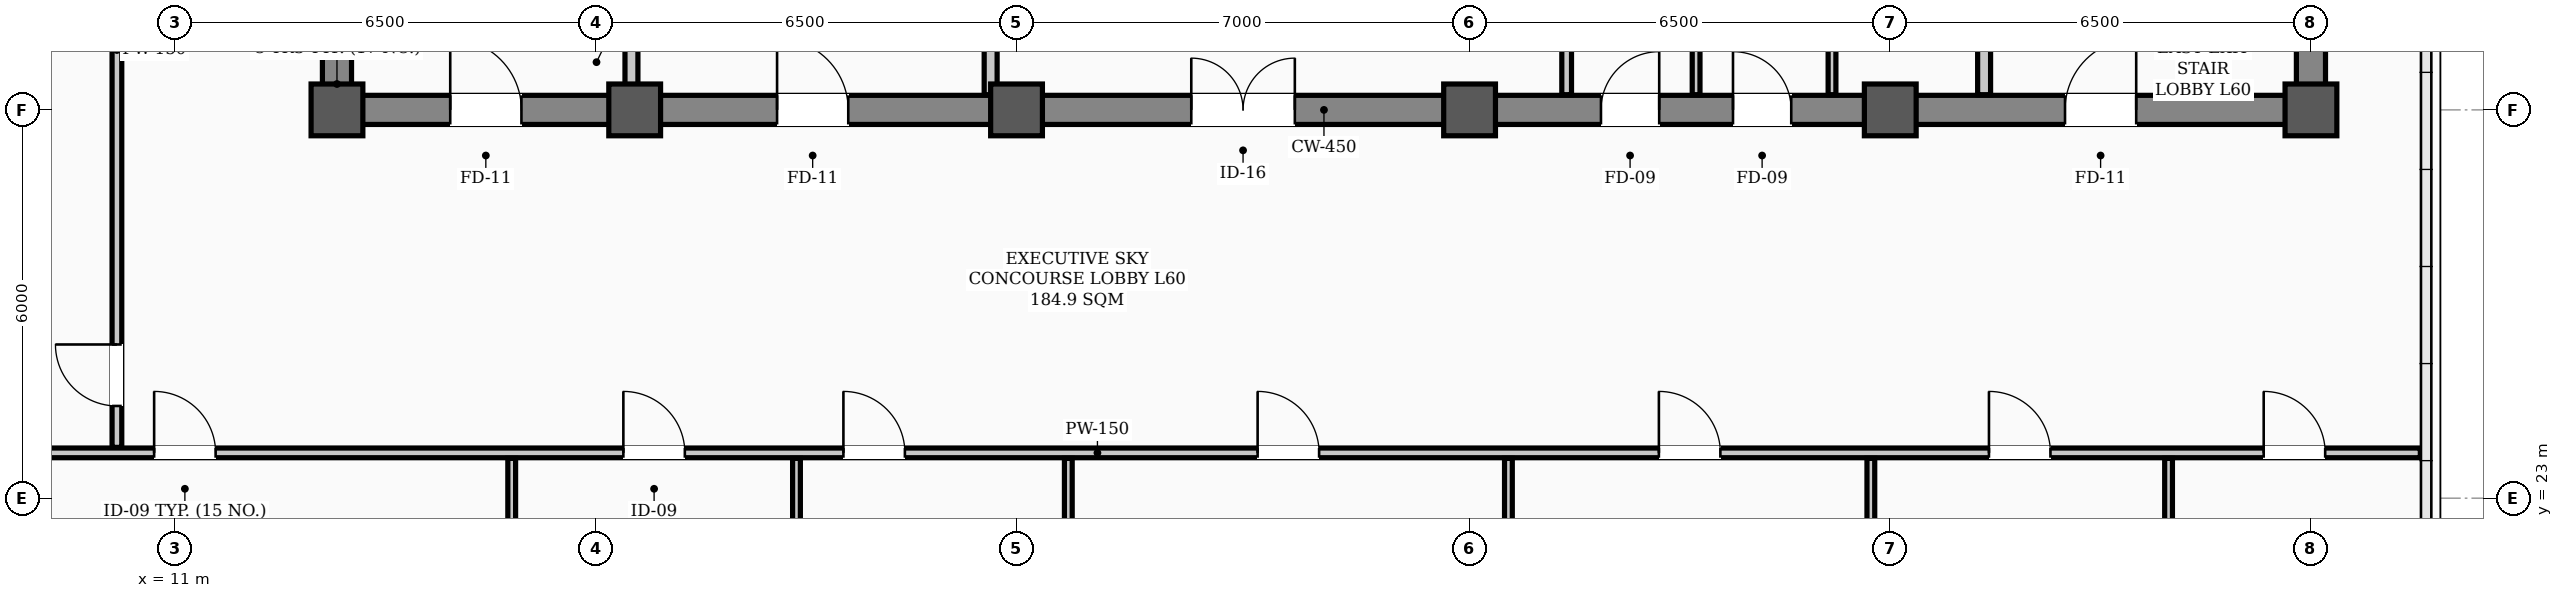
"""IFC4 building model, lengths in metres.
Left out: names, types, materials, properties, quantities, classifications, styles, units other than length and angle.
Written with IfcOpenShell. Run it as: python <this file> out.ifc"""

import sys

from ifc_helpers import new_model, si_unit, direction, frame, frame_2d, origin, origin_2d, place, context, subcontext, project, spatial, rectangle, hollow_rectangle, extrude, element, fill, save


model = new_model("IFC4")
c1 = context("Model", 3, precision=1e-05, world=origin(), true_north=direction((0.0, 1.0)))
c2 = subcontext(c1, "Body", "Model", "MODEL_VIEW")
j1 = project(units=[si_unit("LENGTHUNIT", "METRE"), si_unit("PLANEANGLEUNIT", "RADIAN")], contexts=[c1])
p1 = place(None, origin())
s1 = spatial("IfcSite", under=j1, at=p1, CompositionType="ELEMENT")
p2 = place(p1, origin())
s2 = spatial("IfcBuilding", under=s1, at=p2, CompositionType="ELEMENT")
p3 = place(p2, frame((0.0, 0.0, 242.3)))
s3 = spatial("IfcBuildingStorey", under=s2, at=p3, CompositionType="ELEMENT", Elevation=242.3)
for number, where, z_axis, x_axis in (
    (1, (13.5, 29.0, 0.0), (0.0, 0.0, 1.0), (1.0, 0.0, 0.0)),
    (2, (18.1, 29.0, 0.0), (0.0, 0.0, 1.0), (1.0, 0.0, 0.0)),
    (3, (24.0, 29.0, 0.0), (0.0, 0.0, 1.0), (1.0, 0.0, 0.0)),
    (4, (31.0, 29.0, 0.0), (0.0, 0.0, 1.0), (1.0, 0.0, 0.0)),
    (5, (37.5, 29.0, 0.0), (0.0, 0.0, 1.0), (1.0, 0.0, 0.0)),
    (6, (44.0, 29.0, 0.0), (0.0, 0.0, 1.0), (1.0, 0.0, 0.0)),
):
    element("IfcColumn", number, at=place(p3, frame(where, z_axis=z_axis, x_axis=x_axis)), inside=s3, PredefinedType="COLUMN", context=c2, shape_type="SweptSolid", body=[
        extrude(hollow_rectangle(XDim=0.8, YDim=0.8, WallThickness=0.032, InnerFilletRadius=0.016, OuterFilletRadius=0.048, at=origin_2d()), origin(), (0.0, 0.0, 1.0), 3.9),
    ])
p4 = place(p3, frame((13.5, 29.0, 0.0), z_axis=(0.0, 0.0, 1.0), x_axis=(1.0, 0.0, 0.0)))
e7 = element("IfcWall", 7, at=p4, inside=s3, PredefinedType="SHEAR", context=c2, shape_type="SweptSolid", body=[
    extrude(rectangle(XDim=30.5, YDim=0.45, at=frame_2d((15.25, 0.0))), origin(), (0.0, 0.0, 1.0), 3.72),
])
p5 = place(p4, frame((1.75, 0.0, 0.0)))
e8 = element("IfcOpeningElement", 8, at=p5, cuts=e7, PredefinedType="OPENING", context=c2, shape_type="SweptSolid", body=[
    extrude(rectangle(XDim=1.1, YDim=2.08, at=frame_2d((0.55, 1.04))), frame((0.0, 0.235, 0.0), z_axis=(0.0, -1.0, 0.0), x_axis=(1.0, 0.0, 0.0)), (0.0, 0.0, 1.0), 0.47),
])
p6 = place(p4, frame((26.7, 0.0, 0.0)))
e9 = element("IfcOpeningElement", 9, at=p6, cuts=e7, PredefinedType="OPENING", context=c2, shape_type="SweptSolid", body=[
    extrude(rectangle(XDim=1.1, YDim=2.08, at=frame_2d((0.55, 1.04))), frame((0.0, 0.235, 0.0), z_axis=(0.0, -1.0, 0.0), x_axis=(1.0, 0.0, 0.0)), (0.0, 0.0, 1.0), 0.47),
])
p7 = place(p4, frame((6.8, 0.0, 0.0)))
e10 = element("IfcOpeningElement", 10, at=p7, cuts=e7, PredefinedType="OPENING", context=c2, shape_type="SweptSolid", body=[
    extrude(rectangle(XDim=1.1, YDim=2.08, at=frame_2d((0.55, 1.04))), frame((0.0, 0.235, 0.0), z_axis=(0.0, -1.0, 0.0), x_axis=(1.0, 0.0, 0.0)), (0.0, 0.0, 1.0), 0.47),
])
p8 = place(p4, frame((13.2, 0.0, 0.0)))
e11 = element("IfcOpeningElement", 11, at=p8, cuts=e7, PredefinedType="OPENING", context=c2, shape_type="SweptSolid", body=[
    extrude(rectangle(XDim=1.6, YDim=2.08, at=frame_2d((0.8, 1.04))), frame((0.0, 0.235, 0.0), z_axis=(0.0, -1.0, 0.0), x_axis=(1.0, 0.0, 0.0)), (0.0, 0.0, 1.0), 0.47),
])
p9 = place(p4, frame((19.53, 0.0, 0.0)))
e12 = element("IfcOpeningElement", 12, at=p9, cuts=e7, PredefinedType="OPENING", context=c2, shape_type="SweptSolid", body=[
    extrude(rectangle(XDim=0.9, YDim=2.08, at=frame_2d((0.45, 1.04))), frame((0.0, 0.235, 0.0), z_axis=(0.0, -1.0, 0.0), x_axis=(1.0, 0.0, 0.0)), (0.0, 0.0, 1.0), 0.47),
])
p10 = place(p4, frame((21.57, 0.0, 0.0)))
e13 = element("IfcOpeningElement", 13, at=p10, cuts=e7, PredefinedType="OPENING", context=c2, shape_type="SweptSolid", body=[
    extrude(rectangle(XDim=0.9, YDim=2.08, at=frame_2d((0.45, 1.04))), frame((0.0, 0.235, 0.0), z_axis=(0.0, -1.0, 0.0), x_axis=(1.0, 0.0, 0.0)), (0.0, 0.0, 1.0), 0.47),
])
for number, where, z_axis, x_axis in (
    (14, (13.5, 29.35, 0.0), (0.0, 0.0, 1.0), (0.0, 1.0, 0.0)),
    (15, (44.0, 29.35, 0.0), (0.0, 0.0, 1.0), (0.0, 1.0, 0.0)),
):
    element("IfcWall", number, at=place(p3, frame(where, z_axis=z_axis, x_axis=x_axis)), inside=s3, PredefinedType="SHEAR", context=c2, shape_type="SweptSolid", body=[
        extrude(rectangle(XDim=8.6, YDim=0.45, at=frame_2d((4.3, 0.0))), origin(), (0.0, 0.0, 1.0), 3.72),
    ])
p11 = place(p3, frame((4.81, 23.7, 0.0), z_axis=(0.0, 0.0, 1.0), x_axis=(1.0, 0.0, 0.0)))
e16 = element("IfcWall", 16, at=p11, inside=s3, PredefinedType="PARTITIONING", context=c2, shape_type="SweptSolid", body=[
    extrude(rectangle(XDim=40.88, YDim=0.15, at=frame_2d((20.44, 0.0))), origin(), (0.0, 0.0, 1.0), 3.2),
])
p12 = place(p11, frame((5.865, 0.0, 0.0)))
e17 = element("IfcOpeningElement", 17, at=p12, cuts=e16, PredefinedType="OPENING", context=c2, shape_type="SweptSolid", body=[
    extrude(rectangle(XDim=0.95, YDim=2.08, at=frame_2d((0.475, 1.04))), frame((0.0, 0.085, 0.0), z_axis=(0.0, -1.0, 0.0), x_axis=(1.0, 0.0, 0.0)), (0.0, 0.0, 1.0), 0.17),
])
p13 = place(p11, frame((13.115, 0.0, 0.0)))
e18 = element("IfcOpeningElement", 18, at=p13, cuts=e16, PredefinedType="OPENING", context=c2, shape_type="SweptSolid", body=[
    extrude(rectangle(XDim=0.95, YDim=2.08, at=frame_2d((0.475, 1.04))), frame((0.0, 0.085, 0.0), z_axis=(0.0, -1.0, 0.0), x_axis=(1.0, 0.0, 0.0)), (0.0, 0.0, 1.0), 0.17),
])
p14 = place(p11, frame((16.515, 0.0, 0.0)))
e19 = element("IfcOpeningElement", 19, at=p14, cuts=e16, PredefinedType="OPENING", context=c2, shape_type="SweptSolid", body=[
    extrude(rectangle(XDim=0.95, YDim=2.08, at=frame_2d((0.475, 1.04))), frame((0.0, 0.085, 0.0), z_axis=(0.0, -1.0, 0.0), x_axis=(1.0, 0.0, 0.0)), (0.0, 0.0, 1.0), 0.17),
])
p15 = place(p11, frame((22.915, 0.0, 0.0)))
e20 = element("IfcOpeningElement", 20, at=p15, cuts=e16, PredefinedType="OPENING", context=c2, shape_type="SweptSolid", body=[
    extrude(rectangle(XDim=0.95, YDim=2.08, at=frame_2d((0.475, 1.04))), frame((0.0, 0.085, 0.0), z_axis=(0.0, -1.0, 0.0), x_axis=(1.0, 0.0, 0.0)), (0.0, 0.0, 1.0), 0.17),
])
p16 = place(p11, frame((29.115, 0.0, 0.0)))
e21 = element("IfcOpeningElement", 21, at=p16, cuts=e16, PredefinedType="OPENING", context=c2, shape_type="SweptSolid", body=[
    extrude(rectangle(XDim=0.95, YDim=2.08, at=frame_2d((0.475, 1.04))), frame((0.0, 0.085, 0.0), z_axis=(0.0, -1.0, 0.0), x_axis=(1.0, 0.0, 0.0)), (0.0, 0.0, 1.0), 0.17),
])
p17 = place(p11, frame((34.215, 0.0, 0.0)))
e22 = element("IfcOpeningElement", 22, at=p17, cuts=e16, PredefinedType="OPENING", context=c2, shape_type="SweptSolid", body=[
    extrude(rectangle(XDim=0.95, YDim=2.08, at=frame_2d((0.475, 1.04))), frame((0.0, 0.085, 0.0), z_axis=(0.0, -1.0, 0.0), x_axis=(1.0, 0.0, 0.0)), (0.0, 0.0, 1.0), 0.17),
])
p18 = place(p11, frame((38.46, 0.0, 0.0)))
e23 = element("IfcOpeningElement", 23, at=p18, cuts=e16, PredefinedType="OPENING", context=c2, shape_type="SweptSolid", body=[
    extrude(rectangle(XDim=0.95, YDim=2.08, at=frame_2d((0.475, 1.04))), frame((0.0, 0.085, 0.0), z_axis=(0.0, -1.0, 0.0), x_axis=(1.0, 0.0, 0.0)), (0.0, 0.0, 1.0), 0.17),
])
p19 = place(p3, frame((18.05, 29.235, 0.0), z_axis=(0.0, 0.0, 1.0), x_axis=(0.0, 1.0, 0.0)))
e24 = element("IfcWall", 24, at=p19, inside=s3, PredefinedType="STANDARD", context=c2, shape_type="SweptSolid", body=[
    extrude(rectangle(XDim=1.065, YDim=0.2, at=frame_2d((0.532, 0.0))), origin(), (0.0, 0.0, 1.0), 3.35),
])
p20 = place(p3, frame((38.95, 29.235, 0.0), z_axis=(0.0, 0.0, 1.0), x_axis=(0.0, 1.0, 0.0)))
e25 = element("IfcWall", 25, at=p20, inside=s3, PredefinedType="STANDARD", context=c2, shape_type="SweptSolid", body=[
    extrude(rectangle(XDim=1.065, YDim=0.2, at=frame_2d((0.532, 0.0))), origin(), (0.0, 0.0, 1.0), 3.72),
])
p21 = place(p3, frame((23.6, 29.235, 0.0), z_axis=(0.0, 0.0, 1.0), x_axis=(0.0, 1.0, 0.0)))
e26 = element("IfcWall", 26, at=p21, inside=s3, PredefinedType="STANDARD", context=c2, shape_type="SweptSolid", body=[
    extrude(rectangle(XDim=5.465, YDim=0.2, at=frame_2d((2.732, 0.0))), origin(), (0.0, 0.0, 1.0), 3.2),
])
p22 = place(p3, frame((32.5, 29.235, 0.0), z_axis=(0.0, 0.0, 1.0), x_axis=(0.0, 1.0, 0.0)))
e27 = element("IfcWall", 27, at=p22, inside=s3, PredefinedType="PARTITIONING", context=c2, shape_type="SweptSolid", body=[
    extrude(rectangle(XDim=2.53, YDim=0.15, at=frame_2d((1.265, 0.0))), origin(), (0.0, 0.0, 1.0), 3.35),
])
for number, where, z_axis, x_axis in (
    (28, (36.6, 29.235, 0.0), (0.0, 0.0, 1.0), (0.0, 1.0, 0.0)),
    (29, (34.5, 29.235, 0.0), (0.0, 0.0, 1.0), (0.0, 1.0, 0.0)),
):
    element("IfcWall", number, at=place(p3, frame(where, z_axis=z_axis, x_axis=x_axis)), inside=s3, PredefinedType="PARTITIONING", context=c2, shape_type="SweptSolid", body=[
        extrude(rectangle(XDim=2.53, YDim=0.12, at=frame_2d((1.265, 0.0))), origin(), (0.0, 0.0, 1.0), 3.35),
    ])
p23 = place(p3, frame((10.1, 23.785, 0.0), z_axis=(0.0, 0.0, 1.0), x_axis=(0.0, 1.0, 0.0)))
e30 = element("IfcWall", 30, at=p23, inside=s3, PredefinedType="PARTITIONING", context=c2, shape_type="SweptSolid", body=[
    extrude(rectangle(XDim=12.28, YDim=0.15, at=frame_2d((6.14, 0.0))), origin(), (0.0, 0.0, 1.0), 3.1),
])
p24 = place(p23, frame((0.64, 0.0, 0.0)))
e31 = element("IfcOpeningElement", 31, at=p24, cuts=e30, PredefinedType="OPENING", context=c2, shape_type="SweptSolid", body=[
    extrude(rectangle(XDim=0.95, YDim=2.08, at=frame_2d((0.475, 1.04))), frame((0.0, 0.085, 0.0), z_axis=(0.0, -1.0, 0.0), x_axis=(1.0, 0.0, 0.0)), (0.0, 0.0, 1.0), 0.17),
])
for number, where, z_axis, x_axis in (
    (32, (16.2, 12.41, 0.0), (0.0, 0.0, 1.0), (0.0, 1.0, 0.0)),
    (33, (20.6, 12.41, 0.0), (0.0, 0.0, 1.0), (0.0, 1.0, 0.0)),
):
    element("IfcWall", number, at=place(p3, frame(where, z_axis=z_axis, x_axis=x_axis)), inside=s3, PredefinedType="PARTITIONING", context=c2, shape_type="SweptSolid", body=[
        extrude(rectangle(XDim=11.205, YDim=0.12, at=frame_2d((5.603, 0.0))), origin(), (0.0, 0.0, 1.0), 3.1),
    ])
p25 = place(p3, frame((24.8, 14.17, 0.0), z_axis=(0.0, 0.0, 1.0), x_axis=(0.0, 1.0, 0.0)))
e34 = element("IfcWall", 34, at=p25, inside=s3, PredefinedType="PARTITIONING", context=c2, shape_type="SweptSolid", body=[
    extrude(rectangle(XDim=9.445, YDim=0.12, at=frame_2d((4.723, 0.0))), origin(), (0.0, 0.0, 1.0), 3.1),
])
for number, where, z_axis, x_axis in (
    (35, (31.6, 12.41, 0.0), (0.0, 0.0, 1.0), (0.0, 1.0, 0.0)),
    (36, (37.2, 12.41, 0.0), (0.0, 0.0, 1.0), (0.0, 1.0, 0.0)),
):
    element("IfcWall", number, at=place(p3, frame(where, z_axis=z_axis, x_axis=x_axis)), inside=s3, PredefinedType="PARTITIONING", context=c2, shape_type="SweptSolid", body=[
        extrude(rectangle(XDim=11.205, YDim=0.12, at=frame_2d((5.603, 0.0))), origin(), (0.0, 0.0, 1.0), 3.1),
    ])
p26 = place(p3, frame((41.8, 12.41, 0.0), z_axis=(0.0, 0.0, 1.0), x_axis=(0.0, 1.0, 0.0)))
e37 = element("IfcWall", 37, at=p26, inside=s3, PredefinedType="PARTITIONING", context=c2, shape_type="SweptSolid", body=[
    extrude(rectangle(XDim=11.205, YDim=0.12, at=frame_2d((5.603, 0.0))), origin(), (0.0, 0.0, 1.0), 3.72),
])
p27 = place(p5, origin())
e38 = element("IfcDoor", 38, at=p27, inside=s3, OperationType="SINGLE_SWING_LEFT", PredefinedType="DOOR", context=c2, shape_type="SweptSolid", body=[
    extrude(rectangle(XDim=1.1, YDim=2.08, at=frame_2d((0.55, 1.04))), frame((0.0, 0.025, 0.0), z_axis=(0.0, -1.0, 0.0), x_axis=(1.0, 0.0, 0.0)), (0.0, 0.0, 1.0), 0.05),
])
fill(e8, e38)
p28 = place(p6, origin())
e39 = element("IfcDoor", 39, at=p28, inside=s3, OperationType="SINGLE_SWING_RIGHT", PredefinedType="DOOR", context=c2, shape_type="SweptSolid", body=[
    extrude(rectangle(XDim=1.1, YDim=2.08, at=frame_2d((0.55, 1.04))), frame((0.0, 0.025, 0.0), z_axis=(0.0, -1.0, 0.0), x_axis=(1.0, 0.0, 0.0)), (0.0, 0.0, 1.0), 0.05),
])
fill(e9, e39)
p29 = place(p7, origin())
e40 = element("IfcDoor", 40, at=p29, inside=s3, OperationType="SINGLE_SWING_LEFT", PredefinedType="DOOR", context=c2, shape_type="SweptSolid", body=[
    extrude(rectangle(XDim=1.1, YDim=2.08, at=frame_2d((0.55, 1.04))), frame((0.0, 0.025, 0.0), z_axis=(0.0, -1.0, 0.0), x_axis=(1.0, 0.0, 0.0)), (0.0, 0.0, 1.0), 0.05),
])
fill(e10, e40)
p30 = place(p8, origin())
e41 = element("IfcDoor", 41, at=p30, inside=s3, OperationType="DOUBLE_DOOR_SINGLE_SWING", PredefinedType="DOOR", context=c2, shape_type="SweptSolid", body=[
    extrude(rectangle(XDim=1.6, YDim=2.08, at=frame_2d((0.8, 1.04))), frame((0.0, 0.025, 0.0), z_axis=(0.0, -1.0, 0.0), x_axis=(1.0, 0.0, 0.0)), (0.0, 0.0, 1.0), 0.05),
])
fill(e11, e41)
p31 = place(p9, origin())
e42 = element("IfcDoor", 42, at=p31, inside=s3, OperationType="SINGLE_SWING_RIGHT", PredefinedType="DOOR", context=c2, shape_type="SweptSolid", body=[
    extrude(rectangle(XDim=0.9, YDim=2.08, at=frame_2d((0.45, 1.04))), frame((0.0, 0.025, 0.0), z_axis=(0.0, -1.0, 0.0), x_axis=(1.0, 0.0, 0.0)), (0.0, 0.0, 1.0), 0.05),
])
fill(e12, e42)
p32 = place(p10, origin())
e43 = element("IfcDoor", 43, at=p32, inside=s3, OperationType="SINGLE_SWING_LEFT", PredefinedType="DOOR", context=c2, shape_type="SweptSolid", body=[
    extrude(rectangle(XDim=0.9, YDim=2.08, at=frame_2d((0.45, 1.04))), frame((0.0, 0.025, 0.0), z_axis=(0.0, -1.0, 0.0), x_axis=(1.0, 0.0, 0.0)), (0.0, 0.0, 1.0), 0.05),
])
fill(e13, e43)
p33 = place(p12, origin())
e44 = element("IfcDoor", 44, at=p33, inside=s3, OperationType="SINGLE_SWING_LEFT", PredefinedType="DOOR", context=c2, shape_type="SweptSolid", body=[
    extrude(rectangle(XDim=0.95, YDim=2.08, at=frame_2d((0.475, 1.04))), frame((0.0, 0.025, 0.0), z_axis=(0.0, -1.0, 0.0), x_axis=(1.0, 0.0, 0.0)), (0.0, 0.0, 1.0), 0.05),
])
fill(e17, e44)
p34 = place(p13, origin())
e45 = element("IfcDoor", 45, at=p34, inside=s3, OperationType="SINGLE_SWING_LEFT", PredefinedType="DOOR", context=c2, shape_type="SweptSolid", body=[
    extrude(rectangle(XDim=0.95, YDim=2.08, at=frame_2d((0.475, 1.04))), frame((0.0, 0.025, 0.0), z_axis=(0.0, -1.0, 0.0), x_axis=(1.0, 0.0, 0.0)), (0.0, 0.0, 1.0), 0.05),
])
fill(e18, e45)
p35 = place(p14, origin())
e46 = element("IfcDoor", 46, at=p35, inside=s3, OperationType="SINGLE_SWING_LEFT", PredefinedType="DOOR", context=c2, shape_type="SweptSolid", body=[
    extrude(rectangle(XDim=0.95, YDim=2.08, at=frame_2d((0.475, 1.04))), frame((0.0, 0.025, 0.0), z_axis=(0.0, -1.0, 0.0), x_axis=(1.0, 0.0, 0.0)), (0.0, 0.0, 1.0), 0.05),
])
fill(e19, e46)
p36 = place(p15, origin())
e47 = element("IfcDoor", 47, at=p36, inside=s3, OperationType="SINGLE_SWING_LEFT", PredefinedType="DOOR", context=c2, shape_type="SweptSolid", body=[
    extrude(rectangle(XDim=0.95, YDim=2.08, at=frame_2d((0.475, 1.04))), frame((0.0, 0.025, 0.0), z_axis=(0.0, -1.0, 0.0), x_axis=(1.0, 0.0, 0.0)), (0.0, 0.0, 1.0), 0.05),
])
fill(e20, e47)
p37 = place(p16, origin())
e48 = element("IfcDoor", 48, at=p37, inside=s3, OperationType="SINGLE_SWING_LEFT", PredefinedType="DOOR", context=c2, shape_type="SweptSolid", body=[
    extrude(rectangle(XDim=0.95, YDim=2.08, at=frame_2d((0.475, 1.04))), frame((0.0, 0.025, 0.0), z_axis=(0.0, -1.0, 0.0), x_axis=(1.0, 0.0, 0.0)), (0.0, 0.0, 1.0), 0.05),
])
fill(e21, e48)
p38 = place(p17, origin())
e49 = element("IfcDoor", 49, at=p38, inside=s3, OperationType="SINGLE_SWING_LEFT", PredefinedType="DOOR", context=c2, shape_type="SweptSolid", body=[
    extrude(rectangle(XDim=0.95, YDim=2.08, at=frame_2d((0.475, 1.04))), frame((0.0, 0.025, 0.0), z_axis=(0.0, -1.0, 0.0), x_axis=(1.0, 0.0, 0.0)), (0.0, 0.0, 1.0), 0.05),
])
fill(e22, e49)
p39 = place(p18, origin())
e50 = element("IfcDoor", 50, at=p39, inside=s3, OperationType="SINGLE_SWING_LEFT", PredefinedType="DOOR", context=c2, shape_type="SweptSolid", body=[
    extrude(rectangle(XDim=0.95, YDim=2.08, at=frame_2d((0.475, 1.04))), frame((0.0, 0.025, 0.0), z_axis=(0.0, -1.0, 0.0), x_axis=(1.0, 0.0, 0.0)), (0.0, 0.0, 1.0), 0.05),
])
fill(e23, e50)
p40 = place(p24, origin())
e51 = element("IfcDoor", 51, at=p40, inside=s3, OperationType="SINGLE_SWING_RIGHT", PredefinedType="DOOR", context=c2, shape_type="SweptSolid", body=[
    extrude(rectangle(XDim=0.95, YDim=2.08, at=frame_2d((0.475, 1.04))), frame((0.0, 0.025, 0.0), z_axis=(0.0, -1.0, 0.0), x_axis=(1.0, 0.0, 0.0)), (0.0, 0.0, 1.0), 0.05),
])
fill(e31, e51)
save(model, sys.argv[1])
